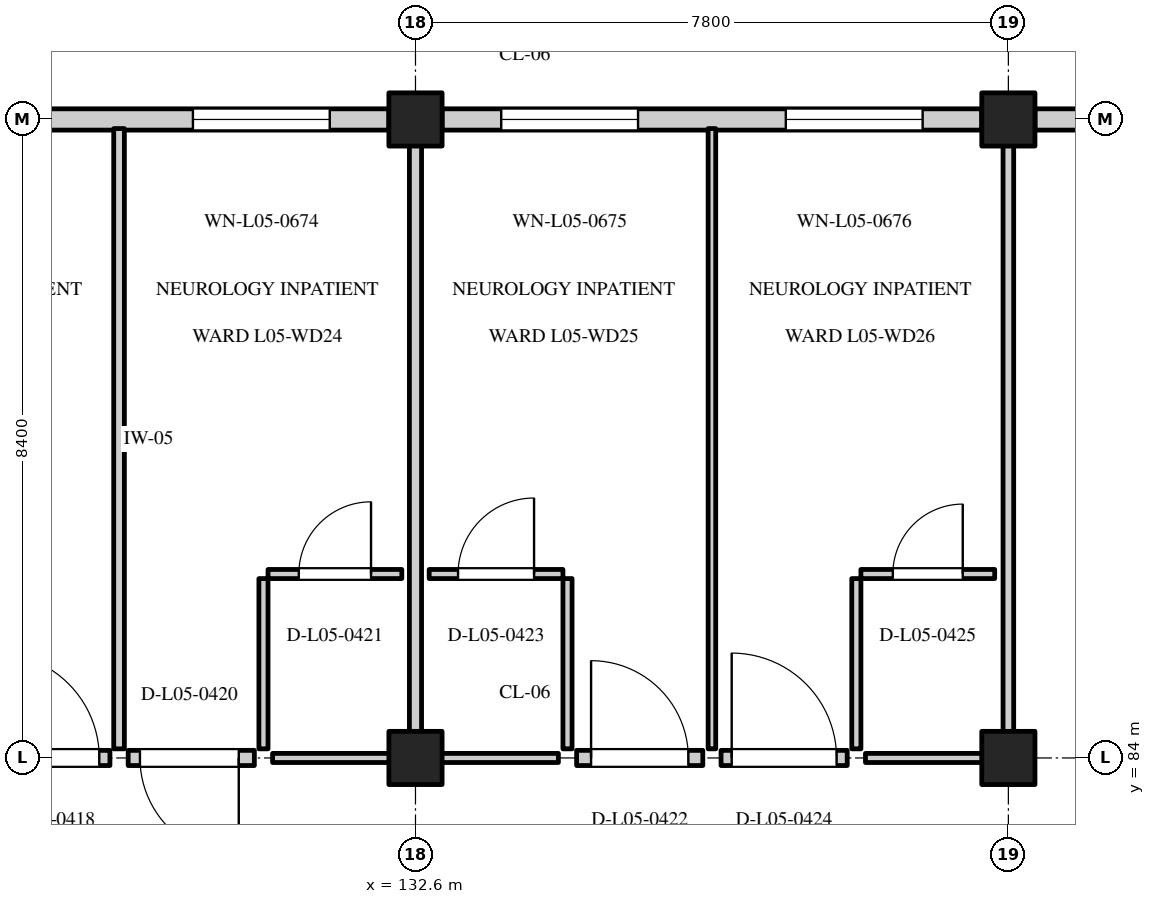
"""IFC4 building model, lengths in metres.
Left out: names, types, materials, properties, quantities, classifications, styles, units other than length and angle.
Written with IfcOpenShell. Run it as: python <this file> out.ifc"""

import sys

from ifc_helpers import new_model, si_unit, direction, frame, frame_2d, origin, origin_2d, place, context, subcontext, project, spatial, rectangle, extrude, element, fill, save


model = new_model("IFC4")
c1 = context("Model", 3, precision=1e-05, world=origin(), true_north=direction((0.0, 1.0)))
c2 = subcontext(c1, "Body", "Model", "MODEL_VIEW")
j1 = project(units=[si_unit("LENGTHUNIT", "METRE"), si_unit("PLANEANGLEUNIT", "RADIAN")], contexts=[c1])
p1 = place(None, origin())
s1 = spatial("IfcSite", under=j1, at=p1, CompositionType="ELEMENT")
p2 = place(p1, origin())
s2 = spatial("IfcBuilding", under=s1, at=p2, CompositionType="ELEMENT")
p3 = place(p2, frame((0.0, 0.0, 22.2)))
s3 = spatial("IfcBuildingStorey", under=s2, at=p3, CompositionType="ELEMENT", Elevation=22.2)
for number, where, z_axis, x_axis in (
    (1, (132.6, 84.0, 0.0), (0.0, 0.0, 1.0), (1.0, 0.0, 0.0)),
    (2, (132.6, 92.4, 0.0), (0.0, 0.0, 1.0), (1.0, 0.0, 0.0)),
    (3, (140.4, 84.0, 0.0), (0.0, 0.0, 1.0), (1.0, 0.0, 0.0)),
    (4, (140.4, 92.4, 0.0), (0.0, 0.0, 1.0), (1.0, 0.0, 0.0)),
):
    element("IfcColumn", number, at=place(p3, frame(where, z_axis=z_axis, x_axis=x_axis)), inside=s3, PredefinedType="COLUMN", context=c2, shape_type="SweptSolid", body=[
        extrude(rectangle(XDim=0.7, YDim=0.7, at=origin_2d()), origin(), (0.0, 0.0, 1.0), 3.9),
    ])
p4 = place(p3, frame((125.15, 92.4, 0.0), z_axis=(0.0, 0.0, 1.0), x_axis=(1.0, 0.0, 0.0)))
e5 = element("IfcWall", 5, at=p4, inside=s3, PredefinedType="STANDARD", context=c2, shape_type="SweptSolid", body=[
    extrude(rectangle(XDim=7.1, YDim=0.28, at=frame_2d((3.55, 0.0))), origin(), (0.0, 0.0, 1.0), 3.05),
])
p5 = place(p4, frame((0.778, 0.0, 0.8)))
e6 = element("IfcOpeningElement", 6, at=p5, cuts=e5, PredefinedType="OPENING", context=c2, shape_type="SweptSolid", body=[
    extrude(rectangle(XDim=1.8, YDim=1.65, at=frame_2d((0.9, 0.825))), frame((0.0, 0.152, 0.0), z_axis=(0.0, -1.0, 0.0), x_axis=(1.0, 0.0, 0.0)), (0.0, 0.0, 1.0), 0.304),
])
p6 = place(p4, frame((4.522, 0.0, 0.8)))
e7 = element("IfcOpeningElement", 7, at=p6, cuts=e5, PredefinedType="OPENING", context=c2, shape_type="SweptSolid", body=[
    extrude(rectangle(XDim=1.8, YDim=1.65, at=frame_2d((0.9, 0.825))), frame((0.0, 0.152, 0.0), z_axis=(0.0, -1.0, 0.0), x_axis=(1.0, 0.0, 0.0)), (0.0, 0.0, 1.0), 0.304),
])
p7 = place(p3, frame((132.95, 92.4, 0.0), z_axis=(0.0, 0.0, 1.0), x_axis=(1.0, 0.0, 0.0)))
e8 = element("IfcWall", 8, at=p7, inside=s3, PredefinedType="STANDARD", context=c2, shape_type="SweptSolid", body=[
    extrude(rectangle(XDim=7.1, YDim=0.28, at=frame_2d((3.55, 0.0))), origin(), (0.0, 0.0, 1.0), 3.05),
])
p8 = place(p7, frame((0.778, 0.0, 0.8)))
e9 = element("IfcOpeningElement", 9, at=p8, cuts=e8, PredefinedType="OPENING", context=c2, shape_type="SweptSolid", body=[
    extrude(rectangle(XDim=1.8, YDim=1.55, at=frame_2d((0.9, 0.775))), frame((0.0, 0.152, 0.0), z_axis=(0.0, -1.0, 0.0), x_axis=(1.0, 0.0, 0.0)), (0.0, 0.0, 1.0), 0.304),
])
p9 = place(p7, frame((4.522, 0.0, 0.8)))
e10 = element("IfcOpeningElement", 10, at=p9, cuts=e8, PredefinedType="OPENING", context=c2, shape_type="SweptSolid", body=[
    extrude(rectangle(XDim=1.8, YDim=1.55, at=frame_2d((0.9, 0.775))), frame((0.0, 0.152, 0.0), z_axis=(0.0, -1.0, 0.0), x_axis=(1.0, 0.0, 0.0)), (0.0, 0.0, 1.0), 0.304),
])
p10 = place(p3, frame((140.75, 92.4, 0.0), z_axis=(0.0, 0.0, 1.0), x_axis=(1.0, 0.0, 0.0)))
e11 = element("IfcWall", 11, at=p10, inside=s3, PredefinedType="STANDARD", context=c2, shape_type="SweptSolid", body=[
    extrude(rectangle(XDim=7.075, YDim=0.28, at=frame_2d((3.538, 0.0))), origin(), (0.0, 0.0, 1.0), 3.05),
])
p11 = place(p10, frame((0.778, 0.0, 0.8)))
e12 = element("IfcOpeningElement", 12, at=p11, cuts=e11, PredefinedType="OPENING", context=c2, shape_type="SweptSolid", body=[
    extrude(rectangle(XDim=1.8, YDim=1.45, at=frame_2d((0.9, 0.725))), frame((0.0, 0.152, 0.0), z_axis=(0.0, -1.0, 0.0), x_axis=(1.0, 0.0, 0.0)), (0.0, 0.0, 1.0), 0.304),
])
p12 = place(p10, frame((4.522, 0.0, 0.8)))
e13 = element("IfcOpeningElement", 13, at=p12, cuts=e11, PredefinedType="OPENING", context=c2, shape_type="SweptSolid", body=[
    extrude(rectangle(XDim=1.8, YDim=1.45, at=frame_2d((0.9, 0.725))), frame((0.0, 0.152, 0.0), z_axis=(0.0, -1.0, 0.0), x_axis=(1.0, 0.0, 0.0)), (0.0, 0.0, 1.0), 0.304),
])
p13 = place(p3, frame((128.7, 84.12, 0.0), z_axis=(0.0, 0.0, 1.0), x_axis=(0.0, 1.0, 0.0)))
e14 = element("IfcWall", 14, at=p13, inside=s3, PredefinedType="PARTITIONING", context=c2, shape_type="SweptSolid", body=[
    extrude(rectangle(XDim=8.16, YDim=0.14, at=frame_2d((4.08, 0.0))), origin(), (0.0, 0.0, 1.0), 3.58),
])
p14 = place(p3, frame((126.92, 84.0, 0.0), z_axis=(0.0, 0.0, 1.0), x_axis=(1.0, 0.0, 0.0)))
e15 = element("IfcWall", 15, at=p14, inside=s3, PredefinedType="STANDARD", context=c2, shape_type="SweptSolid", body=[
    extrude(rectangle(XDim=1.66, YDim=0.2, at=frame_2d((0.83, 0.0))), origin(), (0.0, 0.0, 1.0), 2.95),
])
p15 = place(p14, frame((0.14, 0.0, 0.0)))
e16 = element("IfcOpeningElement", 16, at=p15, cuts=e15, PredefinedType="OPENING", context=c2, shape_type="SweptSolid", body=[
    extrude(rectangle(XDim=1.38, YDim=2.2, at=frame_2d((0.69, 1.1))), frame((0.0, 0.112, 0.0), z_axis=(0.0, -1.0, 0.0), x_axis=(1.0, 0.0, 0.0)), (0.0, 0.0, 1.0), 0.224),
])
p16 = place(p3, frame((132.6, 84.12, 0.0), z_axis=(0.0, 0.0, 1.0), x_axis=(0.0, 1.0, 0.0)))
e17 = element("IfcWall", 17, at=p16, inside=s3, PredefinedType="PARTITIONING", context=c2, shape_type="SweptSolid", body=[
    extrude(rectangle(XDim=8.16, YDim=0.16, at=frame_2d((4.08, 0.0))), origin(), (0.0, 0.0, 1.0), 2.95),
])
p17 = place(p3, frame((128.82, 84.0, 0.0), z_axis=(0.0, 0.0, 1.0), x_axis=(1.0, 0.0, 0.0)))
e18 = element("IfcWall", 18, at=p17, inside=s3, PredefinedType="STANDARD", context=c2, shape_type="SweptSolid", body=[
    extrude(rectangle(XDim=1.66, YDim=0.2, at=frame_2d((0.83, 0.0))), origin(), (0.0, 0.0, 1.0), 2.95),
])
p18 = place(p17, frame((0.155, 0.0, 0.0)))
e19 = element("IfcOpeningElement", 19, at=p18, cuts=e18, PredefinedType="OPENING", context=c2, shape_type="SweptSolid", body=[
    extrude(rectangle(XDim=1.3, YDim=2.15, at=frame_2d((0.65, 1.075))), frame((0.0, 0.112, 0.0), z_axis=(0.0, -1.0, 0.0), x_axis=(1.0, 0.0, 0.0)), (0.0, 0.0, 1.0), 0.224),
])
p19 = place(p3, frame((130.72, 84.0, 0.0), z_axis=(0.0, 0.0, 1.0), x_axis=(1.0, 0.0, 0.0)))
e20 = element("IfcWall", 20, at=p19, inside=s3, PredefinedType="PARTITIONING", context=c2, shape_type="SweptSolid", body=[
    extrude(rectangle(XDim=1.76, YDim=0.12, at=frame_2d((0.88, 0.0))), origin(), (0.0, 0.0, 1.0), 2.95),
])
p20 = place(p3, frame((130.6, 84.12, 0.0), z_axis=(0.0, 0.0, 1.0), x_axis=(0.0, 1.0, 0.0)))
e21 = element("IfcWall", 21, at=p20, inside=s3, PredefinedType="PARTITIONING", context=c2, shape_type="SweptSolid", body=[
    extrude(rectangle(XDim=2.24, YDim=0.12, at=frame_2d((1.12, 0.0))), origin(), (0.0, 0.0, 1.0), 3.58),
])
p21 = place(p3, frame((130.66, 86.42, 0.0), z_axis=(0.0, 0.0, 1.0), x_axis=(1.0, 0.0, 0.0)))
e22 = element("IfcWall", 22, at=p21, inside=s3, PredefinedType="PARTITIONING", context=c2, shape_type="SweptSolid", body=[
    extrude(rectangle(XDim=1.76, YDim=0.12, at=frame_2d((0.88, 0.0))), origin(), (0.0, 0.0, 1.0), 3.58),
])
p22 = place(p21, frame((0.405, 0.0, 0.0)))
e23 = element("IfcOpeningElement", 23, at=p22, cuts=e22, PredefinedType="OPENING", context=c2, shape_type="SweptSolid", body=[
    extrude(rectangle(XDim=0.95, YDim=2.1, at=frame_2d((0.475, 1.05))), frame((0.0, 0.072, 0.0), z_axis=(0.0, -1.0, 0.0), x_axis=(1.0, 0.0, 0.0)), (0.0, 0.0, 1.0), 0.144),
])
p23 = place(p3, frame((136.5, 84.12, 0.0), z_axis=(0.0, 0.0, 1.0), x_axis=(0.0, 1.0, 0.0)))
e24 = element("IfcWall", 24, at=p23, inside=s3, PredefinedType="PARTITIONING", context=c2, shape_type="SweptSolid", body=[
    extrude(rectangle(XDim=8.16, YDim=0.1, at=frame_2d((4.08, 0.0))), origin(), (0.0, 0.0, 1.0), 3.58),
])
p24 = place(p3, frame((134.72, 84.0, 0.0), z_axis=(0.0, 0.0, 1.0), x_axis=(1.0, 0.0, 0.0)))
e25 = element("IfcWall", 25, at=p24, inside=s3, PredefinedType="STANDARD", context=c2, shape_type="SweptSolid", body=[
    extrude(rectangle(XDim=1.66, YDim=0.2, at=frame_2d((0.83, 0.0))), origin(), (0.0, 0.0, 1.0), 2.95),
])
p25 = place(p24, frame((0.19, 0.0, 0.0)))
e26 = element("IfcOpeningElement", 26, at=p25, cuts=e25, PredefinedType="OPENING", context=c2, shape_type="SweptSolid", body=[
    extrude(rectangle(XDim=1.28, YDim=2.15, at=frame_2d((0.64, 1.075))), frame((0.0, 0.112, 0.0), z_axis=(0.0, -1.0, 0.0), x_axis=(1.0, 0.0, 0.0)), (0.0, 0.0, 1.0), 0.224),
])
p26 = place(p3, frame((132.72, 84.0, 0.0), z_axis=(0.0, 0.0, 1.0), x_axis=(1.0, 0.0, 0.0)))
e27 = element("IfcWall", 27, at=p26, inside=s3, PredefinedType="PARTITIONING", context=c2, shape_type="SweptSolid", body=[
    extrude(rectangle(XDim=1.76, YDim=0.12, at=frame_2d((0.88, 0.0))), origin(), (0.0, 0.0, 1.0), 2.95),
])
p27 = place(p3, frame((134.6, 84.12, 0.0), z_axis=(0.0, 0.0, 1.0), x_axis=(0.0, 1.0, 0.0)))
e28 = element("IfcWall", 28, at=p27, inside=s3, PredefinedType="PARTITIONING", context=c2, shape_type="SweptSolid", body=[
    extrude(rectangle(XDim=2.24, YDim=0.12, at=frame_2d((1.12, 0.0))), origin(), (0.0, 0.0, 1.0), 3.58),
])
p28 = place(p3, frame((132.78, 86.42, 0.0), z_axis=(0.0, 0.0, 1.0), x_axis=(1.0, 0.0, 0.0)))
e29 = element("IfcWall", 29, at=p28, inside=s3, PredefinedType="PARTITIONING", context=c2, shape_type="SweptSolid", body=[
    extrude(rectangle(XDim=1.76, YDim=0.12, at=frame_2d((0.88, 0.0))), origin(), (0.0, 0.0, 1.0), 3.58),
])
p29 = place(p28, frame((0.38, 0.0, 0.0)))
e30 = element("IfcOpeningElement", 30, at=p29, cuts=e29, PredefinedType="OPENING", context=c2, shape_type="SweptSolid", body=[
    extrude(rectangle(XDim=1.0, YDim=2.1, at=frame_2d((0.5, 1.05))), frame((0.0, 0.072, 0.0), z_axis=(0.0, -1.0, 0.0), x_axis=(1.0, 0.0, 0.0)), (0.0, 0.0, 1.0), 0.144),
])
p30 = place(p3, frame((140.4, 84.12, 0.0), z_axis=(0.0, 0.0, 1.0), x_axis=(0.0, 1.0, 0.0)))
e31 = element("IfcWall", 31, at=p30, inside=s3, PredefinedType="PARTITIONING", context=c2, shape_type="SweptSolid", body=[
    extrude(rectangle(XDim=8.16, YDim=0.14, at=frame_2d((4.08, 0.0))), origin(), (0.0, 0.0, 1.0), 3.58),
])
p31 = place(p3, frame((136.62, 84.0, 0.0), z_axis=(0.0, 0.0, 1.0), x_axis=(1.0, 0.0, 0.0)))
e32 = element("IfcWall", 32, at=p31, inside=s3, PredefinedType="STANDARD", context=c2, shape_type="SweptSolid", body=[
    extrude(rectangle(XDim=1.66, YDim=0.2, at=frame_2d((0.83, 0.0))), origin(), (0.0, 0.0, 1.0), 2.95),
])
p32 = place(p31, frame((0.14, 0.0, 0.0)))
e33 = element("IfcOpeningElement", 33, at=p32, cuts=e32, PredefinedType="OPENING", context=c2, shape_type="SweptSolid", body=[
    extrude(rectangle(XDim=1.38, YDim=2.2, at=frame_2d((0.69, 1.1))), frame((0.0, 0.112, 0.0), z_axis=(0.0, -1.0, 0.0), x_axis=(1.0, 0.0, 0.0)), (0.0, 0.0, 1.0), 0.224),
])
p33 = place(p3, frame((138.52, 84.0, 0.0), z_axis=(0.0, 0.0, 1.0), x_axis=(1.0, 0.0, 0.0)))
e34 = element("IfcWall", 34, at=p33, inside=s3, PredefinedType="PARTITIONING", context=c2, shape_type="SweptSolid", body=[
    extrude(rectangle(XDim=1.76, YDim=0.12, at=frame_2d((0.88, 0.0))), origin(), (0.0, 0.0, 1.0), 2.95),
])
p34 = place(p3, frame((138.4, 84.12, 0.0), z_axis=(0.0, 0.0, 1.0), x_axis=(0.0, 1.0, 0.0)))
e35 = element("IfcWall", 35, at=p34, inside=s3, PredefinedType="PARTITIONING", context=c2, shape_type="SweptSolid", body=[
    extrude(rectangle(XDim=2.24, YDim=0.12, at=frame_2d((1.12, 0.0))), origin(), (0.0, 0.0, 1.0), 3.58),
])
p35 = place(p3, frame((138.46, 86.42, 0.0), z_axis=(0.0, 0.0, 1.0), x_axis=(1.0, 0.0, 0.0)))
e36 = element("IfcWall", 36, at=p35, inside=s3, PredefinedType="PARTITIONING", context=c2, shape_type="SweptSolid", body=[
    extrude(rectangle(XDim=1.76, YDim=0.12, at=frame_2d((0.88, 0.0))), origin(), (0.0, 0.0, 1.0), 3.58),
])
p36 = place(p35, frame((0.42, 0.0, 0.0)))
e37 = element("IfcOpeningElement", 37, at=p36, cuts=e36, PredefinedType="OPENING", context=c2, shape_type="SweptSolid", body=[
    extrude(rectangle(XDim=0.92, YDim=2.08, at=frame_2d((0.46, 1.04))), frame((0.0, 0.072, 0.0), z_axis=(0.0, -1.0, 0.0), x_axis=(1.0, 0.0, 0.0)), (0.0, 0.0, 1.0), 0.144),
])
p37 = place(p6, origin())
e38 = element("IfcWindow", 38, at=p37, inside=s3, PartitioningType="DOUBLE_PANEL_VERTICAL", PredefinedType="WINDOW", context=c2, shape_type="SweptSolid", body=[
    extrude(rectangle(XDim=1.8, YDim=1.65, at=frame_2d((0.9, 0.825))), frame((0.0, 0.03, 0.0), z_axis=(0.0, -1.0, 0.0), x_axis=(1.0, 0.0, 0.0)), (0.0, 0.0, 1.0), 0.06),
])
fill(e7, e38)
p38 = place(p8, origin())
e39 = element("IfcWindow", 39, at=p38, inside=s3, PartitioningType="DOUBLE_PANEL_VERTICAL", PredefinedType="WINDOW", context=c2, shape_type="SweptSolid", body=[
    extrude(rectangle(XDim=1.8, YDim=1.55, at=frame_2d((0.9, 0.775))), frame((0.0, 0.03, 0.0), z_axis=(0.0, -1.0, 0.0), x_axis=(1.0, 0.0, 0.0)), (0.0, 0.0, 1.0), 0.06),
])
fill(e9, e39)
p39 = place(p9, origin())
e40 = element("IfcWindow", 40, at=p39, inside=s3, PartitioningType="DOUBLE_PANEL_VERTICAL", PredefinedType="WINDOW", context=c2, shape_type="SweptSolid", body=[
    extrude(rectangle(XDim=1.8, YDim=1.55, at=frame_2d((0.9, 0.775))), frame((0.0, 0.03, 0.0), z_axis=(0.0, -1.0, 0.0), x_axis=(1.0, 0.0, 0.0)), (0.0, 0.0, 1.0), 0.06),
])
fill(e10, e40)
p40 = place(p15, origin())
e41 = element("IfcDoor", 41, at=p40, inside=s3, OperationType="SINGLE_SWING_LEFT", PredefinedType="DOOR", context=c2, shape_type="SweptSolid", body=[
    extrude(rectangle(XDim=1.38, YDim=2.2, at=frame_2d((0.69, 1.1))), frame((0.0, 0.025, 0.0), z_axis=(0.0, -1.0, 0.0), x_axis=(1.0, 0.0, 0.0)), (0.0, 0.0, 1.0), 0.05),
])
fill(e16, e41)
p41 = place(p18, origin())
e42 = element("IfcDoor", 42, at=p41, inside=s3, OperationType="SINGLE_SWING_RIGHT", PredefinedType="DOOR", context=c2, shape_type="SweptSolid", body=[
    extrude(rectangle(XDim=1.3, YDim=2.15, at=frame_2d((0.65, 1.075))), frame((0.0, 0.025, 0.0), z_axis=(0.0, -1.0, 0.0), x_axis=(1.0, 0.0, 0.0)), (0.0, 0.0, 1.0), 0.05),
])
fill(e19, e42)
p42 = place(p22, frame((0.95, 0.0, 0.0), z_axis=(0.0, 0.0, 1.0), x_axis=(-1.0, 0.0, 0.0)))
e43 = element("IfcDoor", 43, at=p42, inside=s3, OperationType="SINGLE_SWING_LEFT", PredefinedType="DOOR", context=c2, shape_type="SweptSolid", body=[
    extrude(rectangle(XDim=0.95, YDim=2.1, at=frame_2d((0.475, 1.05))), frame((0.0, 0.025, 0.0), z_axis=(0.0, -1.0, 0.0), x_axis=(1.0, 0.0, 0.0)), (0.0, 0.0, 1.0), 0.05),
])
fill(e23, e43)
p43 = place(p25, origin())
e44 = element("IfcDoor", 44, at=p43, inside=s3, OperationType="SINGLE_SWING_LEFT", PredefinedType="DOOR", context=c2, shape_type="SweptSolid", body=[
    extrude(rectangle(XDim=1.28, YDim=2.15, at=frame_2d((0.64, 1.075))), frame((0.0, 0.025, 0.0), z_axis=(0.0, -1.0, 0.0), x_axis=(1.0, 0.0, 0.0)), (0.0, 0.0, 1.0), 0.05),
])
fill(e26, e44)
p44 = place(p29, frame((1.0, 0.0, 0.0), z_axis=(0.0, 0.0, 1.0), x_axis=(-1.0, 0.0, 0.0)))
e45 = element("IfcDoor", 45, at=p44, inside=s3, OperationType="SINGLE_SWING_LEFT", PredefinedType="DOOR", context=c2, shape_type="SweptSolid", body=[
    extrude(rectangle(XDim=1.0, YDim=2.1, at=frame_2d((0.5, 1.05))), frame((0.0, 0.025, 0.0), z_axis=(0.0, -1.0, 0.0), x_axis=(1.0, 0.0, 0.0)), (0.0, 0.0, 1.0), 0.05),
])
fill(e30, e45)
p45 = place(p32, origin())
e46 = element("IfcDoor", 46, at=p45, inside=s3, OperationType="SINGLE_SWING_LEFT", PredefinedType="DOOR", context=c2, shape_type="SweptSolid", body=[
    extrude(rectangle(XDim=1.38, YDim=2.2, at=frame_2d((0.69, 1.1))), frame((0.0, 0.025, 0.0), z_axis=(0.0, -1.0, 0.0), x_axis=(1.0, 0.0, 0.0)), (0.0, 0.0, 1.0), 0.05),
])
fill(e33, e46)
p46 = place(p36, frame((0.92, 0.0, 0.0), z_axis=(0.0, 0.0, 1.0), x_axis=(-1.0, 0.0, 0.0)))
e47 = element("IfcDoor", 47, at=p46, inside=s3, OperationType="SINGLE_SWING_LEFT", PredefinedType="DOOR", context=c2, shape_type="SweptSolid", body=[
    extrude(rectangle(XDim=0.92, YDim=2.08, at=frame_2d((0.46, 1.04))), frame((0.0, 0.025, 0.0), z_axis=(0.0, -1.0, 0.0), x_axis=(1.0, 0.0, 0.0)), (0.0, 0.0, 1.0), 0.05),
])
fill(e37, e47)
save(model, sys.argv[1])
